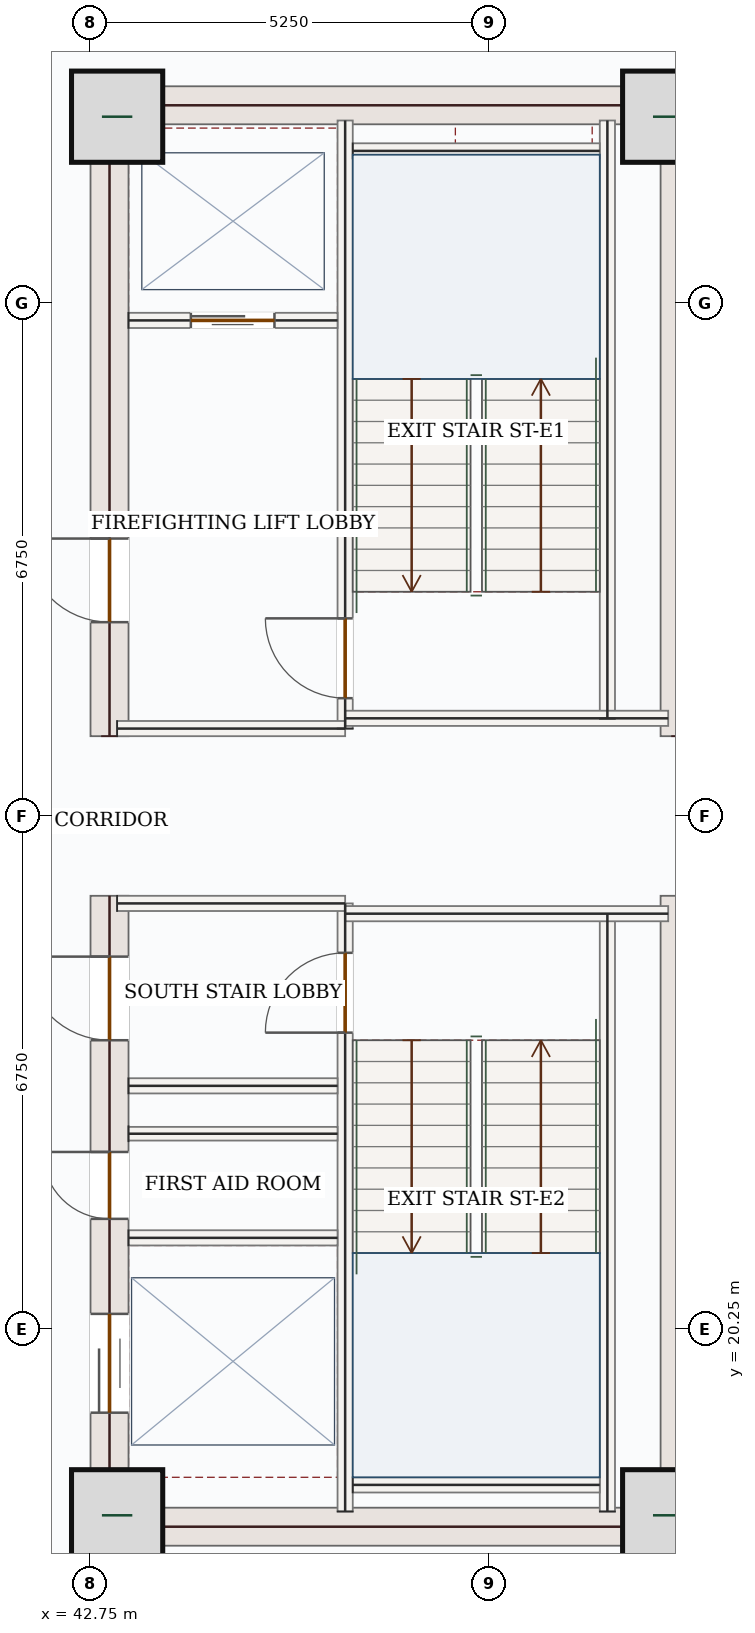
"""IFC4 building model, lengths in metres.
Left out: names, types, materials, properties, quantities, classifications, styles, units other than length and angle.
Written with IfcOpenShell. Run it as: python <this file> out.ifc"""

import sys

from ifc_helpers import new_model, si_unit, direction, frame, frame_2d, origin, origin_2d, place, context, subcontext, project, spatial, rectangle, extrude, source, transform, mapped, element, fill, save


model = new_model("IFC4")
c1 = context("Model", 3, precision=1e-05, world=origin(), true_north=direction((0.0, 1.0)))
c2 = subcontext(c1, "Body", "Model", "MODEL_VIEW")
j1 = project(units=[si_unit("LENGTHUNIT", "METRE"), si_unit("PLANEANGLEUNIT", "RADIAN")], contexts=[c1])
p1 = place(None, origin())
s1 = spatial("IfcSite", under=j1, at=p1, CompositionType="ELEMENT")
p2 = place(p1, origin())
s2 = spatial("IfcBuilding", under=s1, at=p2, CompositionType="ELEMENT")
p3 = place(p2, frame((0.0, 0.0, 170.7)))
s3 = spatial("IfcBuildingStorey", under=s2, at=p3, CompositionType="ELEMENT", Elevation=170.7)
p4 = place(p3, frame((43.0, 17.4, 0.0), z_axis=(0.0, 0.0, 1.0), x_axis=(0.0, 1.0, 0.0)))
e1 = element("IfcWall", 1, at=p4, inside=s3, PredefinedType="SHEAR", context=c2, shape_type="SweptSolid", body=[
    extrude(rectangle(XDim=8.55, YDim=0.5, at=frame_2d((4.275, 0.0))), origin(), (0.0, 0.0, 1.0), 3.62),
])
p5 = place(p4, frame((6.65, 0.0, 0.0)))
e2 = element("IfcOpeningElement", 2, at=p5, cuts=e1, PredefinedType="OPENING", context=c2, shape_type="SweptSolid", body=[
    extrude(rectangle(XDim=1.1, YDim=2.2, at=frame_2d((0.55, 1.1))), frame((0.0, 0.26, 0.0), z_axis=(0.0, -1.0, 0.0), x_axis=(1.0, 0.0, 0.0)), (0.0, 0.0, 1.0), 0.52),
])
p6 = place(p4, frame((1.75, 0.0, 0.0)))
e3 = element("IfcOpeningElement", 3, at=p6, cuts=e1, PredefinedType="OPENING", context=c2, shape_type="SweptSolid", body=[
    extrude(rectangle(XDim=1.3, YDim=2.2, at=frame_2d((0.65, 1.1))), frame((0.0, 0.26, 0.0), z_axis=(0.0, -1.0, 0.0), x_axis=(1.0, 0.0, 0.0)), (0.0, 0.0, 1.0), 0.52),
])
p7 = place(p4, frame((4.3, 0.0, 0.0)))
e4 = element("IfcOpeningElement", 4, at=p7, cuts=e1, PredefinedType="OPENING", context=c2, shape_type="SweptSolid", body=[
    extrude(rectangle(XDim=0.88, YDim=2.1, at=frame_2d((0.44, 1.05))), frame((0.0, 0.26, 0.0), z_axis=(0.0, -1.0, 0.0), x_axis=(1.0, 0.0, 0.0)), (0.0, 0.0, 1.0), 0.52),
])
p8 = place(p3, frame((43.0, 28.05, 0.0), z_axis=(0.0, 0.0, 1.0), x_axis=(0.0, 1.0, 0.0)))
e5 = element("IfcWall", 5, at=p8, inside=s3, PredefinedType="SHEAR", context=c2, shape_type="SweptSolid", body=[
    extrude(rectangle(XDim=8.55, YDim=0.5, at=frame_2d((4.275, 0.0))), origin(), (0.0, 0.0, 1.0), 3.62),
])
p9 = place(p8, frame((1.5, 0.0, 0.0)))
e6 = element("IfcOpeningElement", 6, at=p9, cuts=e5, PredefinedType="OPENING", context=c2, shape_type="SweptSolid", body=[
    extrude(rectangle(XDim=1.1, YDim=2.2, at=frame_2d((0.55, 1.1))), frame((0.0, 0.26, 0.0), z_axis=(0.0, -1.0, 0.0), x_axis=(1.0, 0.0, 0.0)), (0.0, 0.0, 1.0), 0.52),
])
m1 = source(origin(), c2, "Body", "SweptSolid", [
    extrude(rectangle(XDim=8.55, YDim=0.5, at=frame_2d((4.275, 0.0))), origin(), (0.0, 0.0, 1.0), 3.62),
])
for number, where, z_axis, x_axis in (
    (7, (50.5, 17.4, 0.0), (0.0, 0.0, 1.0), (0.0, 1.0, 0.0)),
    (8, (50.5, 28.05, 0.0), (0.0, 0.0, 1.0), (0.0, 1.0, 0.0)),
):
    element("IfcWall", number, at=place(p3, frame(where, z_axis=z_axis, x_axis=x_axis)), inside=s3, PredefinedType="SHEAR", context=c2, shape_type="MappedRepresentation", body=[
        mapped(m1, transform((0.0, 0.0, 0.0), x_axis=(1.0, 0.0, 0.0), y_axis=(0.0, 1.0, 0.0), z_axis=(0.0, 0.0, 1.0), scale=1.0)),
    ])
m2 = source(origin(), c2, "Body", "SweptSolid", [
    extrude(rectangle(XDim=7.0, YDim=0.5, at=frame_2d((3.5, 0.0))), origin(), (0.0, 0.0, 1.0), 3.62),
])
for number, where, z_axis, x_axis in (
    (9, (43.25, 17.65, 0.0), (0.0, 0.0, 1.0), (1.0, 0.0, 0.0)),
    (10, (43.25, 36.35, 0.0), (0.0, 0.0, 1.0), (1.0, 0.0, 0.0)),
):
    element("IfcWall", number, at=place(p3, frame(where, z_axis=z_axis, x_axis=x_axis)), inside=s3, PredefinedType="SHEAR", context=c2, shape_type="MappedRepresentation", body=[
        mapped(m2, transform((0.0, 0.0, 0.0), x_axis=(1.0, 0.0, 0.0), y_axis=(0.0, 1.0, 0.0), z_axis=(0.0, 0.0, 1.0), scale=1.0)),
    ])
m3 = source(origin(), c2, "Body", "SweptSolid", [
    extrude(rectangle(XDim=1.2, YDim=1.2, at=origin_2d()), origin(), (0.0, 0.0, 1.0), 3.9),
])
for number, where, z_axis, x_axis in (
    (11, (43.1, 17.8, 0.0), (0.0, 0.0, 1.0), (1.0, 0.0, 0.0)),
    (12, (50.35, 17.8, 0.0), (0.0, 0.0, 1.0), (1.0, 0.0, 0.0)),
    (13, (43.1, 36.2, 0.0), (0.0, 0.0, 1.0), (1.0, 0.0, 0.0)),
    (14, (50.35, 36.2, 0.0), (0.0, 0.0, 1.0), (1.0, 0.0, 0.0)),
):
    element("IfcColumn", number, at=place(p3, frame(where, z_axis=z_axis, x_axis=x_axis)), inside=s3, PredefinedType="COLUMN", context=c2, shape_type="MappedRepresentation", body=[
        mapped(m3, transform((0.0, 0.0, 0.0), x_axis=(1.0, 0.0, 0.0), y_axis=(0.0, 1.0, 0.0), z_axis=(0.0, 0.0, 1.0), scale=1.0)),
    ])
m4 = source(origin(), c2, "Body", "SweptSolid", [
    extrude(rectangle(XDim=5.258, YDim=0.28, at=frame_2d((2.629, 0.0))), origin(), (0.0, 0.0, 1.0), 3.62),
])
p10 = place(p3, frame((53.06, 18.458, 0.0), z_axis=(0.0, 0.0, 1.0), x_axis=(-0.707106781187, -0.707106781187, 0.0)))
e15 = element("IfcWall", 15, at=p10, inside=s3, PredefinedType="SOLIDWALL", context=c2, shape_type="MappedRepresentation", body=[
    mapped(m4, transform((0.0, 0.0, 0.0), x_axis=(1.0, 0.0, 0.0), y_axis=(0.0, 1.0, 0.0), z_axis=(0.0, 0.0, 1.0), scale=1.0)),
])
m5 = source(origin(), c2, "Body", "SweptSolid", [
    extrude(rectangle(XDim=7.87, YDim=0.2, at=frame_2d((3.935, 0.0))), origin(), (0.0, 0.0, 1.0), 3.62),
])
for number, where, z_axis, x_axis in (
    (16, (49.55, 17.85, 0.0), (0.0, 0.0, 1.0), (0.0, 1.0, 0.0)),
    (17, (49.55, 28.28, 0.0), (0.0, 0.0, 1.0), (0.0, 1.0, 0.0)),
):
    element("IfcWall", number, at=place(p3, frame(where, z_axis=z_axis, x_axis=x_axis)), inside=s3, PredefinedType="SOLIDWALL", context=c2, shape_type="MappedRepresentation", body=[
        mapped(m5, transform((0.0, 0.0, 0.0), x_axis=(1.0, 0.0, 0.0), y_axis=(0.0, 1.0, 0.0), z_axis=(0.0, 0.0, 1.0), scale=1.0)),
    ])
p11 = place(p3, frame((46.1, 17.85, 0.0), z_axis=(0.0, 0.0, 1.0), x_axis=(0.0, 1.0, 0.0)))
e18 = element("IfcWall", 18, at=p11, inside=s3, PredefinedType="SOLIDWALL", context=c2, shape_type="SweptSolid", body=[
    extrude(rectangle(XDim=8.0, YDim=0.2, at=frame_2d((4.0, 0.0))), origin(), (0.0, 0.0, 1.0), 3.62),
])
p12 = place(p11, frame((6.3, 0.0, 0.0)))
e19 = element("IfcOpeningElement", 19, at=p12, cuts=e18, PredefinedType="OPENING", context=c2, shape_type="SweptSolid", body=[
    extrude(rectangle(XDim=1.05, YDim=2.15, at=frame_2d((0.525, 1.075))), frame((0.0, 0.11, 0.0), z_axis=(0.0, -1.0, 0.0), x_axis=(1.0, 0.0, 0.0)), (0.0, 0.0, 1.0), 0.22),
])
p13 = place(p3, frame((46.1, 28.15, 0.0), z_axis=(0.0, 0.0, 1.0), x_axis=(0.0, 1.0, 0.0)))
e20 = element("IfcWall", 20, at=p13, inside=s3, PredefinedType="SOLIDWALL", context=c2, shape_type="SweptSolid", body=[
    extrude(rectangle(XDim=8.0, YDim=0.2, at=frame_2d((4.0, 0.0))), origin(), (0.0, 0.0, 1.0), 3.62),
])
p14 = place(p13, frame((0.4, 0.0, 0.0)))
e21 = element("IfcOpeningElement", 21, at=p14, cuts=e20, PredefinedType="OPENING", context=c2, shape_type="SweptSolid", body=[
    extrude(rectangle(XDim=1.05, YDim=2.15, at=frame_2d((0.525, 1.075))), frame((0.0, 0.11, 0.0), z_axis=(0.0, -1.0, 0.0), x_axis=(1.0, 0.0, 0.0)), (0.0, 0.0, 1.0), 0.22),
])
m6 = source(origin(), c2, "Body", "SweptSolid", [
    extrude(rectangle(XDim=3.0, YDim=0.2, at=frame_2d((1.5, 0.0))), origin(), (0.0, 0.0, 1.0), 3.62),
])
p15 = place(p3, frame((43.1, 25.85, 0.0), z_axis=(0.0, 0.0, 1.0), x_axis=(1.0, 0.0, 0.0)))
e22 = element("IfcWall", 22, at=p15, inside=s3, PredefinedType="SOLIDWALL", context=c2, shape_type="MappedRepresentation", body=[
    mapped(m6, transform((0.0, 0.0, 0.0), x_axis=(1.0, 0.0, 0.0), y_axis=(0.0, 1.0, 0.0), z_axis=(0.0, 0.0, 1.0), scale=1.0)),
])
m7 = source(origin(), c2, "Body", "SweptSolid", [
    extrude(rectangle(XDim=4.25, YDim=0.2, at=frame_2d((2.125, 0.0))), origin(), (0.0, 0.0, 1.0), 3.62),
])
p16 = place(p3, frame((46.1, 25.715, 0.0), z_axis=(0.0, 0.0, 1.0), x_axis=(1.0, 0.0, 0.0)))
e23 = element("IfcWall", 23, at=p16, inside=s3, PredefinedType="SOLIDWALL", context=c2, shape_type="MappedRepresentation", body=[
    mapped(m7, transform((0.0, 0.0, 0.0), x_axis=(1.0, 0.0, 0.0), y_axis=(0.0, 1.0, 0.0), z_axis=(0.0, 0.0, 1.0), scale=1.0)),
])
p17 = place(p3, frame((43.1, 28.15, 0.0), z_axis=(0.0, 0.0, 1.0), x_axis=(1.0, 0.0, 0.0)))
e24 = element("IfcWall", 24, at=p17, inside=s3, PredefinedType="SOLIDWALL", context=c2, shape_type="MappedRepresentation", body=[
    mapped(m6, transform((0.0, 0.0, 0.0), x_axis=(1.0, 0.0, 0.0), y_axis=(0.0, 1.0, 0.0), z_axis=(0.0, 0.0, 1.0), scale=1.0)),
])
p18 = place(p3, frame((46.1, 28.285, 0.0), z_axis=(0.0, 0.0, 1.0), x_axis=(1.0, 0.0, 0.0)))
e25 = element("IfcWall", 25, at=p18, inside=s3, PredefinedType="SOLIDWALL", context=c2, shape_type="MappedRepresentation", body=[
    mapped(m7, transform((0.0, 0.0, 0.0), x_axis=(1.0, 0.0, 0.0), y_axis=(0.0, 1.0, 0.0), z_axis=(0.0, 0.0, 1.0), scale=1.0)),
])
m8 = source(origin(), c2, "Body", "SweptSolid", [
    extrude(rectangle(XDim=3.25, YDim=0.2, at=frame_2d((1.625, 0.0))), origin(), (0.0, 0.0, 1.0), 3.62),
])
for number, where, z_axis, x_axis in (
    (26, (46.2, 35.75, 0.0), (0.0, 0.0, 1.0), (1.0, 0.0, 0.0)),
    (27, (46.2, 18.2, 0.0), (0.0, 0.0, 1.0), (1.0, 0.0, 0.0)),
):
    element("IfcWall", number, at=place(p3, frame(where, z_axis=z_axis, x_axis=x_axis)), inside=s3, PredefinedType="SOLIDWALL", context=c2, shape_type="MappedRepresentation", body=[
        mapped(m8, transform((0.0, 0.0, 0.0), x_axis=(1.0, 0.0, 0.0), y_axis=(0.0, 1.0, 0.0), z_axis=(0.0, 0.0, 1.0), scale=1.0)),
    ])
p19 = place(p3, frame((43.25, 33.52, 0.0), z_axis=(0.0, 0.0, 1.0), x_axis=(1.0, 0.0, 0.0)))
e28 = element("IfcWall", 28, at=p19, inside=s3, PredefinedType="SOLIDWALL", context=c2, shape_type="SweptSolid", body=[
    extrude(rectangle(XDim=2.75, YDim=0.2, at=frame_2d((1.375, 0.0))), origin(), (0.0, 0.0, 1.0), 3.62),
])
p20 = place(p19, frame((0.82, 0.0, 0.0)))
e29 = element("IfcOpeningElement", 29, at=p20, cuts=e28, PredefinedType="OPENING", context=c2, shape_type="SweptSolid", body=[
    extrude(rectangle(XDim=1.1, YDim=2.15, at=frame_2d((0.55, 1.075))), frame((0.0, 0.11, 0.0), z_axis=(0.0, -1.0, 0.0), x_axis=(1.0, 0.0, 0.0)), (0.0, 0.0, 1.0), 0.22),
])
m9 = source(origin(), c2, "Body", "SweptSolid", [
    extrude(rectangle(XDim=2.75, YDim=0.2, at=frame_2d((1.375, 0.0))), origin(), (0.0, 0.0, 1.0), 3.62),
])
for number, where, z_axis, x_axis in (
    (30, (43.25, 23.45, 0.0), (0.0, 0.0, 1.0), (1.0, 0.0, 0.0)),
    (31, (43.25, 21.45, 0.0), (0.0, 0.0, 1.0), (1.0, 0.0, 0.0)),
):
    element("IfcWall", number, at=place(p3, frame(where, z_axis=z_axis, x_axis=x_axis)), inside=s3, PredefinedType="SOLIDWALL", context=c2, shape_type="MappedRepresentation", body=[
        mapped(m9, transform((0.0, 0.0, 0.0), x_axis=(1.0, 0.0, 0.0), y_axis=(0.0, 1.0, 0.0), z_axis=(0.0, 0.0, 1.0), scale=1.0)),
    ])
m10 = source(origin(), c2, "Body", "SweptSolid", [
    extrude(rectangle(XDim=2.75, YDim=0.18, at=frame_2d((1.375, 0.0))), origin(), (0.0, 0.0, 1.0), 3.62),
])
p21 = place(p3, frame((43.25, 22.82, 0.0), z_axis=(0.0, 0.0, 1.0), x_axis=(1.0, 0.0, 0.0)))
e32 = element("IfcWall", 32, at=p21, inside=s3, PredefinedType="PARTITIONING", context=c2, shape_type="MappedRepresentation", body=[
    mapped(m10, transform((0.0, 0.0, 0.0), x_axis=(1.0, 0.0, 0.0), y_axis=(0.0, 1.0, 0.0), z_axis=(0.0, 0.0, 1.0), scale=1.0)),
])
m11 = source(origin(), c2, "Body", "SweptSolid", [
    extrude(rectangle(XDim=1.05, YDim=2.15, at=frame_2d((0.525, 1.075))), frame((0.0, 0.025, 0.0), z_axis=(0.0, -1.0, 0.0), x_axis=(1.0, 0.0, 0.0)), (0.0, 0.0, 1.0), 0.05),
])
p22 = place(p14, origin())
e33 = element("IfcDoor", 33, at=p22, inside=s3, OperationType="SINGLE_SWING_RIGHT", PredefinedType="DOOR", context=c2, shape_type="MappedRepresentation", body=[
    mapped(m11, transform((0.0, 0.0, 0.0), x_axis=(1.0, 0.0, 0.0), y_axis=(0.0, 1.0, 0.0), z_axis=(0.0, 0.0, 1.0), scale=1.0)),
])
fill(e21, e33)
p23 = place(p12, origin())
e34 = element("IfcDoor", 34, at=p23, inside=s3, OperationType="SINGLE_SWING_LEFT", PredefinedType="DOOR", context=c2, shape_type="MappedRepresentation", body=[
    mapped(m11, transform((0.0, 0.0, 0.0), x_axis=(1.0, 0.0, 0.0), y_axis=(0.0, 1.0, 0.0), z_axis=(0.0, 0.0, 1.0), scale=1.0)),
])
fill(e19, e34)
m12 = source(origin(), c2, "Body", "SweptSolid", [
    extrude(rectangle(XDim=1.1, YDim=2.15, at=frame_2d((0.55, 1.075))), frame((0.0, 0.025, 0.0), z_axis=(0.0, -1.0, 0.0), x_axis=(1.0, 0.0, 0.0)), (0.0, 0.0, 1.0), 0.05),
])
p24 = place(p20, origin())
e35 = element("IfcDoor", 35, at=p24, inside=s3, OperationType="DOUBLE_DOOR_SLIDING", PredefinedType="DOOR", context=c2, shape_type="MappedRepresentation", body=[
    mapped(m12, transform((0.0, 0.0, 0.0), x_axis=(1.0, 0.0, 0.0), y_axis=(0.0, 1.0, 0.0), z_axis=(0.0, 0.0, 1.0), scale=1.0)),
])
fill(e29, e35)
m13 = source(origin(), c2, "Body", "SweptSolid", [
    extrude(rectangle(XDim=1.1, YDim=2.2, at=frame_2d((0.55, 1.1))), frame((0.0, 0.025, 0.0), z_axis=(0.0, -1.0, 0.0), x_axis=(1.0, 0.0, 0.0)), (0.0, 0.0, 1.0), 0.05),
])
p25 = place(p9, origin())
e36 = element("IfcDoor", 36, at=p25, inside=s3, OperationType="SINGLE_SWING_RIGHT", PredefinedType="DOOR", context=c2, shape_type="MappedRepresentation", body=[
    mapped(m13, transform((0.0, 0.0, 0.0), x_axis=(1.0, 0.0, 0.0), y_axis=(0.0, 1.0, 0.0), z_axis=(0.0, 0.0, 1.0), scale=1.0)),
])
fill(e6, e36)
p26 = place(p5, origin())
e37 = element("IfcDoor", 37, at=p26, inside=s3, OperationType="SINGLE_SWING_RIGHT", PredefinedType="DOOR", context=c2, shape_type="MappedRepresentation", body=[
    mapped(m13, transform((0.0, 0.0, 0.0), x_axis=(1.0, 0.0, 0.0), y_axis=(0.0, 1.0, 0.0), z_axis=(0.0, 0.0, 1.0), scale=1.0)),
])
fill(e2, e37)
m14 = source(origin(), c2, "Body", "SweptSolid", [
    extrude(rectangle(XDim=1.3, YDim=2.2, at=frame_2d((0.65, 1.1))), frame((0.0, 0.025, 0.0), z_axis=(0.0, -1.0, 0.0), x_axis=(1.0, 0.0, 0.0)), (0.0, 0.0, 1.0), 0.05),
])
p27 = place(p6, origin())
e38 = element("IfcDoor", 38, at=p27, inside=s3, OperationType="DOUBLE_DOOR_SLIDING", PredefinedType="DOOR", context=c2, shape_type="MappedRepresentation", body=[
    mapped(m14, transform((0.0, 0.0, 0.0), x_axis=(1.0, 0.0, 0.0), y_axis=(0.0, 1.0, 0.0), z_axis=(0.0, 0.0, 1.0), scale=1.0)),
])
fill(e3, e38)
m15 = source(origin(), c2, "Body", "SweptSolid", [
    extrude(rectangle(XDim=0.88, YDim=2.1, at=frame_2d((0.44, 1.05))), frame((0.0, 0.025, 0.0), z_axis=(0.0, -1.0, 0.0), x_axis=(1.0, 0.0, 0.0)), (0.0, 0.0, 1.0), 0.05),
])
p28 = place(p7, origin())
e39 = element("IfcDoor", 39, at=p28, inside=s3, OperationType="SINGLE_SWING_RIGHT", PredefinedType="DOOR", context=c2, shape_type="MappedRepresentation", body=[
    mapped(m15, transform((0.0, 0.0, 0.0), x_axis=(1.0, 0.0, 0.0), y_axis=(0.0, 1.0, 0.0), z_axis=(0.0, 0.0, 1.0), scale=1.0)),
])
fill(e4, e39)
save(model, sys.argv[1])
